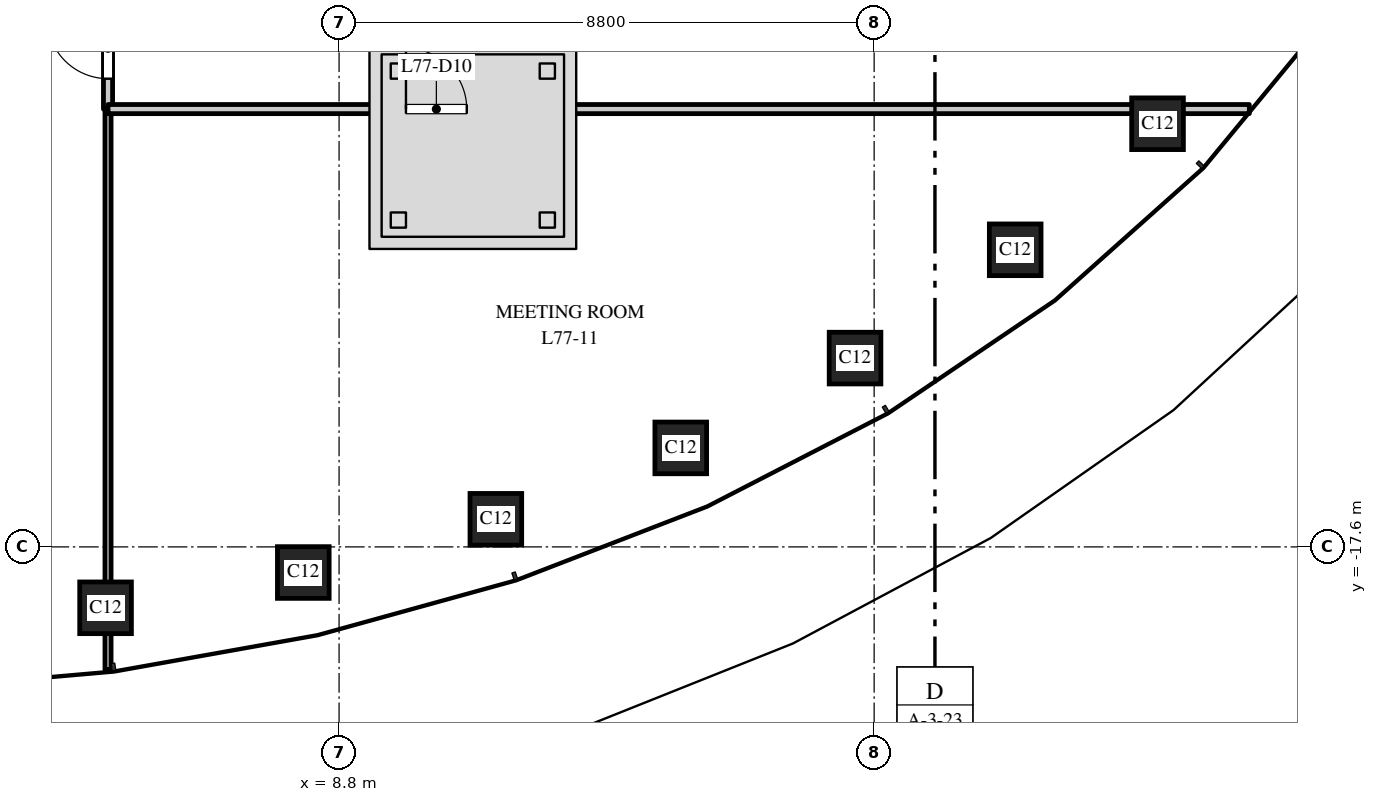
"""IFC4 building model, lengths in metres.
Left out: names, types, materials, properties, quantities, classifications, styles, units other than length and angle.
Written with IfcOpenShell. Run it as: python <this file> out.ifc"""

import sys

from ifc_helpers import new_model, si_unit, direction, frame, frame_2d, origin, origin_2d, place, context, subcontext, project, spatial, rectangle, extrude, element, fill, save


model = new_model("IFC4")
c1 = context("Model", 3, precision=1e-05, world=origin(), true_north=direction((0.0, 1.0)))
c2 = subcontext(c1, "Body", "Model", "MODEL_VIEW")
j1 = project(units=[si_unit("LENGTHUNIT", "METRE"), si_unit("PLANEANGLEUNIT", "RADIAN")], contexts=[c1])
p1 = place(None, origin())
s1 = spatial("IfcSite", under=j1, at=p1, CompositionType="ELEMENT")
p2 = place(p1, origin())
s2 = spatial("IfcBuilding", under=s1, at=p2, CompositionType="ELEMENT")
p3 = place(p2, frame((0.0, 0.0, 351.0)))
s3 = spatial("IfcBuildingStorey", under=s2, at=p3, CompositionType="ELEMENT", Elevation=351.0)
p4 = place(p3, frame((4.96, -18.602, 0.024), z_axis=(-0.120810316709, 0.660641157657, 0.740917085905), x_axis=(-0.983687598335, -0.179885265882, 0.0)))
e1 = element("IfcColumn", 1, at=p4, inside=s3, PredefinedType="COLUMN", context=c2, shape_type="SweptSolid", body=[
    extrude(rectangle(XDim=0.85, YDim=0.85, at=origin_2d()), origin(), (0.0, 0.0, 1.0), 7.39),
])
p5 = place(p3, frame((8.212, -18.021, 0.024), z_axis=(-0.200149570862, 0.640987425601, 0.74099613326), x_axis=(-0.954547364195, -0.298059271805, 0.0)))
e2 = element("IfcColumn", 2, at=p5, inside=s3, PredefinedType="COLUMN", context=c2, shape_type="SweptSolid", body=[
    extrude(rectangle(XDim=0.85, YDim=0.85, at=origin_2d()), origin(), (0.0, 0.0, 1.0), 7.389),
])
p6 = place(p3, frame((11.378, -17.146, 0.024), z_axis=(-0.277631294914, 0.611304327055, 0.741099105254), x_axis=(-0.910497899189, -0.41351369454, 0.0)))
e3 = element("IfcColumn", 3, at=p6, inside=s3, PredefinedType="COLUMN", context=c2, shape_type="SweptSolid", body=[
    extrude(rectangle(XDim=0.85, YDim=0.85, at=origin_2d()), origin(), (0.0, 0.0, 1.0), 7.388),
])
p7 = place(p3, frame((14.419, -15.972, 0.024), z_axis=(-0.352401023351, 0.571317311327, 0.741221996786), x_axis=(-0.851111840755, -0.524984413604, 0.0)))
e4 = element("IfcColumn", 4, at=p7, inside=s3, PredefinedType="COLUMN", context=c2, shape_type="SweptSolid", body=[
    extrude(rectangle(XDim=0.85, YDim=0.85, at=origin_2d()), origin(), (0.0, 0.0, 1.0), 7.387),
])
p8 = place(p3, frame((17.286, -14.495, 0.024), z_axis=(-0.423361918772, 0.520740448808, 0.741346120722), x_axis=(-0.77592413996, -0.630826227282, 0.0)))
e5 = element("IfcColumn", 5, at=p8, inside=s3, PredefinedType="COLUMN", context=c2, shape_type="SweptSolid", body=[
    extrude(rectangle(XDim=0.85, YDim=0.85, at=origin_2d()), origin(), (0.0, 0.0, 1.0), 7.386),
])
p9 = place(p3, frame((19.92, -12.714, 0.024), z_axis=(-0.48918887633, 0.459337710272, 0.7414196593), x_axis=(-0.684514461897, -0.728999280832, 0.0)))
e6 = element("IfcColumn", 6, at=p9, inside=s3, PredefinedType="COLUMN", context=c2, shape_type="SweptSolid", body=[
    extrude(rectangle(XDim=0.85, YDim=0.85, at=origin_2d()), origin(), (0.0, 0.0, 1.0), 7.385),
])
p10 = place(p3, frame((22.261, -10.641, 0.02), z_axis=(-0.376654859375, 0.265757737453, 0.887414188467), x_axis=(-0.57651482377, -0.817086689387, 0.0)))
e7 = element("IfcColumn", 7, at=p10, inside=s3, PredefinedType="COLUMN", context=c2, shape_type="SweptSolid", body=[
    extrude(rectangle(XDim=0.85, YDim=0.85, at=origin_2d()), origin(), (0.0, 0.0, 1.0), 6.175),
])
p11 = place(p3, frame((5.0, -19.62, 0.0), z_axis=(0.0, 0.0, 1.0), x_axis=(0.0, 1.0, 0.0)))
e8 = element("IfcWall", 8, at=p11, inside=s3, PredefinedType="PARTITIONING", context=c2, shape_type="SweptSolid", body=[
    extrude(rectangle(XDim=9.22, YDim=0.1, at=frame_2d((4.61, 0.0))), origin(), (0.0, 0.0, 1.0), 4.5),
])
p12 = place(p3, frame((5.0, -10.4, 0.0), z_axis=(0.0, 0.0, 1.0), x_axis=(0.0, 1.0, 0.0)))
e9 = element("IfcWall", 9, at=p12, inside=s3, PredefinedType="PARTITIONING", context=c2, shape_type="SweptSolid", body=[
    extrude(rectangle(XDim=1.9, YDim=0.15, at=frame_2d((0.95, 0.0))), origin(), (0.0, 0.0, 1.0), 5.2),
])
p13 = place(p12, frame((0.5, 0.0, 0.0)))
e10 = element("IfcOpeningElement", 10, at=p13, cuts=e9, PredefinedType="OPENING", context=c2, shape_type="SweptSolid", body=[
    extrude(rectangle(XDim=1.0, YDim=2.1, at=frame_2d((0.5, 1.05))), frame((0.0, 0.085, 0.0), z_axis=(0.0, -1.0, 0.0), x_axis=(1.0, 0.0, 0.0)), (0.0, 0.0, 1.0), 0.17),
])
p14 = place(p3, frame((5.0, -10.4, 0.0), z_axis=(0.0, 0.0, 1.0), x_axis=(1.0, 0.0, 0.0)))
e11 = element("IfcWall", 11, at=p14, inside=s3, PredefinedType="PARTITIONING", context=c2, shape_type="SweptSolid", body=[
    extrude(rectangle(XDim=18.77, YDim=0.15, at=frame_2d((9.385, 0.0))), origin(), (0.0, 0.0, 1.0), 4.5),
])
p15 = place(p14, frame((4.9, 0.0, 0.0)))
e12 = element("IfcOpeningElement", 12, at=p15, cuts=e11, PredefinedType="OPENING", context=c2, shape_type="SweptSolid", body=[
    extrude(rectangle(XDim=1.0, YDim=2.1, at=frame_2d((0.5, 1.05))), frame((0.0, 0.085, 0.0), z_axis=(0.0, -1.0, 0.0), x_axis=(1.0, 0.0, 0.0)), (0.0, 0.0, 1.0), 0.17),
])
p16 = place(p13, origin())
e13 = element("IfcDoor", 13, at=p16, inside=s3, OperationType="SINGLE_SWING_RIGHT", PredefinedType="DOOR", context=c2, shape_type="SweptSolid", body=[
    extrude(rectangle(XDim=1.0, YDim=2.1, at=frame_2d((0.5, 1.05))), frame((0.0, 0.025, 0.0), z_axis=(0.0, -1.0, 0.0), x_axis=(1.0, 0.0, 0.0)), (0.0, 0.0, 1.0), 0.05),
])
fill(e10, e13)
p17 = place(p15, origin())
e14 = element("IfcDoor", 14, at=p17, inside=s3, OperationType="SINGLE_SWING_LEFT", PredefinedType="DOOR", context=c2, shape_type="SweptSolid", body=[
    extrude(rectangle(XDim=1.0, YDim=2.1, at=frame_2d((0.5, 1.05))), frame((0.0, 0.025, 0.0), z_axis=(0.0, -1.0, 0.0), x_axis=(1.0, 0.0, 0.0)), (0.0, 0.0, 1.0), 0.05),
])
fill(e12, e14)
save(model, sys.argv[1])
